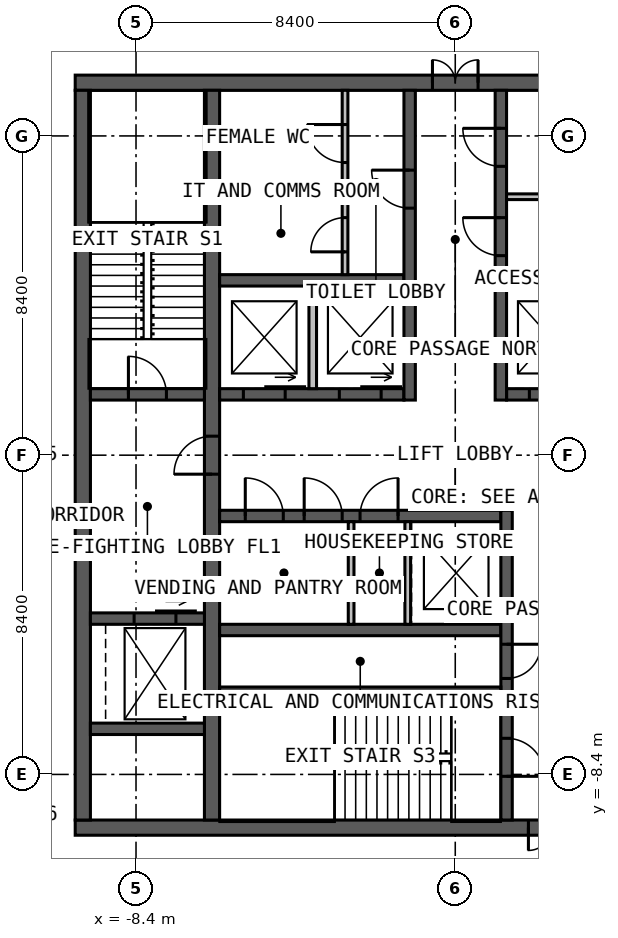
"""IFC4 building model, lengths in metres.
Left out: names, types, materials, properties, quantities, classifications, styles, units other than length and angle.
Written with IfcOpenShell. Run it as: python <this file> out.ifc"""

import sys

from ifc_helpers import new_model, si_unit, direction, frame, frame_2d, origin, place, context, subcontext, project, spatial, rectangle, extrude, element, fill, save


model = new_model("IFC4")
c1 = context("Model", 3, precision=1e-05, world=origin(), true_north=direction((0.0, 1.0)))
c2 = subcontext(c1, "Body", "Model", "MODEL_VIEW")
j1 = project(units=[si_unit("LENGTHUNIT", "METRE"), si_unit("PLANEANGLEUNIT", "RADIAN")], contexts=[c1])
p1 = place(None, origin())
s1 = spatial("IfcSite", under=j1, at=p1, CompositionType="ELEMENT")
p2 = place(p1, origin())
s2 = spatial("IfcBuilding", under=s1, at=p2, CompositionType="ELEMENT")
p3 = place(p2, frame((0.0, 0.0, 248.0)))
s3 = spatial("IfcBuildingStorey", under=s2, at=p3, CompositionType="ELEMENT", Elevation=248.0)
p4 = place(p3, frame((-10.0, 9.8, 0.0), z_axis=(0.0, 0.0, 1.0), x_axis=(1.0, 0.0, 0.0)))
e1 = element("IfcWall", 1, at=p4, inside=s3, PredefinedType="SOLIDWALL", context=c2, shape_type="SweptSolid", body=[
    extrude(rectangle(XDim=20.0, YDim=0.4, at=frame_2d((10.0, 0.0))), origin(), (0.0, 0.0, 1.0), 4.0),
])
p5 = place(p4, frame((9.4, 0.0, 0.0)))
e2 = element("IfcOpeningElement", 2, at=p5, cuts=e1, PredefinedType="OPENING", context=c2, shape_type="SweptSolid", body=[
    extrude(rectangle(XDim=1.2, YDim=2.2, at=frame_2d((0.6, 1.1))), frame((0.0, 0.21, 0.0), z_axis=(0.0, -1.0, 0.0), x_axis=(1.0, 0.0, 0.0)), (0.0, 0.0, 1.0), 0.42),
])
p6 = place(p3, frame((10.0, -9.8, 0.0), z_axis=(0.0, 0.0, 1.0), x_axis=(-1.0, 0.0, 0.0)))
e3 = element("IfcWall", 3, at=p6, inside=s3, PredefinedType="SOLIDWALL", context=c2, shape_type="SweptSolid", body=[
    extrude(rectangle(XDim=20.0, YDim=0.4, at=frame_2d((10.0, 0.0))), origin(), (0.0, 0.0, 1.0), 4.0),
])
p7 = place(p6, frame((6.875, 0.0, 0.0)))
e4 = element("IfcOpeningElement", 4, at=p7, cuts=e3, PredefinedType="OPENING", context=c2, shape_type="SweptSolid", body=[
    extrude(rectangle(XDim=1.2, YDim=2.2, at=frame_2d((0.6, 1.1))), frame((0.0, 0.21, 0.0), z_axis=(0.0, -1.0, 0.0), x_axis=(1.0, 0.0, 0.0)), (0.0, 0.0, 1.0), 0.42),
])
p8 = place(p3, frame((-9.8, 9.6, 0.0), z_axis=(0.0, 0.0, 1.0), x_axis=(0.0, -1.0, 0.0)))
e5 = element("IfcWall", 5, at=p8, inside=s3, PredefinedType="SOLIDWALL", context=c2, shape_type="SweptSolid", body=[
    extrude(rectangle(XDim=19.2, YDim=0.4, at=frame_2d((9.6, 0.0))), origin(), (0.0, 0.0, 1.0), 4.0),
])
p9 = place(p3, frame((-6.4, -9.6, 0.0), z_axis=(0.0, 0.0, 1.0), x_axis=(0.0, 1.0, 0.0)))
e6 = element("IfcWall", 6, at=p9, inside=s3, PredefinedType="SOLIDWALL", context=c2, shape_type="SweptSolid", body=[
    extrude(rectangle(XDim=19.2, YDim=0.4, at=frame_2d((9.6, 0.0))), origin(), (0.0, 0.0, 1.0), 4.0),
])
p10 = place(p9, frame((9.1, 0.0, 0.0)))
e7 = element("IfcOpeningElement", 7, at=p10, cuts=e6, PredefinedType="OPENING", context=c2, shape_type="SweptSolid", body=[
    extrude(rectangle(XDim=1.0, YDim=2.2, at=frame_2d((0.5, 1.1))), frame((0.0, 0.21, 0.0), z_axis=(0.0, -1.0, 0.0), x_axis=(1.0, 0.0, 0.0)), (0.0, 0.0, 1.0), 0.42),
])
p11 = place(p3, frame((-6.2, 1.6, 0.0), z_axis=(0.0, 0.0, 1.0), x_axis=(1.0, 0.0, 0.0)))
e8 = element("IfcWall", 8, at=p11, inside=s3, PredefinedType="SOLIDWALL", context=c2, shape_type="SweptSolid", body=[
    extrude(rectangle(XDim=4.85, YDim=0.3, at=frame_2d((2.425, 0.0))), origin(), (0.0, 0.0, 1.0), 4.0),
])
p12 = place(p11, frame((0.625, 0.0, 0.0)))
e9 = element("IfcOpeningElement", 9, at=p12, cuts=e8, PredefinedType="OPENING", context=c2, shape_type="SweptSolid", body=[
    extrude(rectangle(XDim=1.1, YDim=2.2, at=frame_2d((0.55, 1.1))), frame((0.0, 0.16, 0.0), z_axis=(0.0, -1.0, 0.0), x_axis=(1.0, 0.0, 0.0)), (0.0, 0.0, 1.0), 0.32),
])
p13 = place(p11, frame((3.15, 0.0, 0.0)))
e10 = element("IfcOpeningElement", 10, at=p13, cuts=e8, PredefinedType="OPENING", context=c2, shape_type="SweptSolid", body=[
    extrude(rectangle(XDim=1.1, YDim=2.2, at=frame_2d((0.55, 1.1))), frame((0.0, 0.16, 0.0), z_axis=(0.0, -1.0, 0.0), x_axis=(1.0, 0.0, 0.0)), (0.0, 0.0, 1.0), 0.32),
])
p14 = place(p3, frame((1.35, 1.6, 0.0), z_axis=(0.0, 0.0, 1.0), x_axis=(1.0, 0.0, 0.0)))
e11 = element("IfcWall", 11, at=p14, inside=s3, PredefinedType="SOLIDWALL", context=c2, shape_type="SweptSolid", body=[
    extrude(rectangle(XDim=4.85, YDim=0.3, at=frame_2d((2.425, 0.0))), origin(), (0.0, 0.0, 1.0), 4.0),
])
p15 = place(p14, frame((0.6, 0.0, 0.0)))
e12 = element("IfcOpeningElement", 12, at=p15, cuts=e11, PredefinedType="OPENING", context=c2, shape_type="SweptSolid", body=[
    extrude(rectangle(XDim=1.1, YDim=2.2, at=frame_2d((0.55, 1.1))), frame((0.0, 0.16, 0.0), z_axis=(0.0, -1.0, 0.0), x_axis=(1.0, 0.0, 0.0)), (0.0, 0.0, 1.0), 0.32),
])
p16 = place(p14, frame((3.125, 0.0, 0.0)))
e13 = element("IfcOpeningElement", 13, at=p16, cuts=e11, PredefinedType="OPENING", context=c2, shape_type="SweptSolid", body=[
    extrude(rectangle(XDim=1.1, YDim=2.2, at=frame_2d((0.55, 1.1))), frame((0.0, 0.16, 0.0), z_axis=(0.0, -1.0, 0.0), x_axis=(1.0, 0.0, 0.0)), (0.0, 0.0, 1.0), 0.32),
])
for number, where, z_axis, x_axis in (
    (14, (-6.2, 4.6, 0.0), (0.0, 0.0, 1.0), (1.0, 0.0, 0.0)),
    (15, (1.35, 4.6, 0.0), (0.0, 0.0, 1.0), (1.0, 0.0, 0.0)),
):
    element("IfcWall", number, at=place(p3, frame(where, z_axis=z_axis, x_axis=x_axis)), inside=s3, PredefinedType="SOLIDWALL", context=c2, shape_type="SweptSolid", body=[
        extrude(rectangle(XDim=4.85, YDim=0.3, at=frame_2d((2.425, 0.0))), origin(), (0.0, 0.0, 1.0), 4.0),
    ])
p17 = place(p3, frame((-1.2, 1.45, 0.0), z_axis=(0.0, 0.0, 1.0), x_axis=(0.0, 1.0, 0.0)))
e16 = element("IfcWall", 16, at=p17, inside=s3, PredefinedType="SOLIDWALL", context=c2, shape_type="SweptSolid", body=[
    extrude(rectangle(XDim=8.15, YDim=0.3, at=frame_2d((4.075, 0.0))), origin(), (0.0, 0.0, 1.0), 4.0),
])
p18 = place(p17, frame((5.05, 0.0, 0.0)))
e17 = element("IfcOpeningElement", 17, at=p18, cuts=e16, PredefinedType="OPENING", context=c2, shape_type="SweptSolid", body=[
    extrude(rectangle(XDim=1.0, YDim=2.2, at=frame_2d((0.5, 1.1))), frame((0.0, 0.16, 0.0), z_axis=(0.0, -1.0, 0.0), x_axis=(1.0, 0.0, 0.0)), (0.0, 0.0, 1.0), 0.32),
])
p19 = place(p3, frame((1.2, 1.45, 0.0), z_axis=(0.0, 0.0, 1.0), x_axis=(0.0, 1.0, 0.0)))
e18 = element("IfcWall", 18, at=p19, inside=s3, PredefinedType="SOLIDWALL", context=c2, shape_type="SweptSolid", body=[
    extrude(rectangle(XDim=8.15, YDim=0.3, at=frame_2d((4.075, 0.0))), origin(), (0.0, 0.0, 1.0), 4.0),
])
p20 = place(p19, frame((3.8, 0.0, 0.0)))
e19 = element("IfcOpeningElement", 19, at=p20, cuts=e18, PredefinedType="OPENING", context=c2, shape_type="SweptSolid", body=[
    extrude(rectangle(XDim=1.0, YDim=2.2, at=frame_2d((0.5, 1.1))), frame((0.0, 0.16, 0.0), z_axis=(0.0, -1.0, 0.0), x_axis=(1.0, 0.0, 0.0)), (0.0, 0.0, 1.0), 0.32),
])
p21 = place(p19, frame((6.15, 0.0, 0.0)))
e20 = element("IfcOpeningElement", 20, at=p21, cuts=e18, PredefinedType="OPENING", context=c2, shape_type="SweptSolid", body=[
    extrude(rectangle(XDim=1.0, YDim=2.2, at=frame_2d((0.5, 1.1))), frame((0.0, 0.16, 0.0), z_axis=(0.0, -1.0, 0.0), x_axis=(1.0, 0.0, 0.0)), (0.0, 0.0, 1.0), 0.32),
])
p22 = place(p3, frame((-6.2, -1.6, 0.0), z_axis=(0.0, 0.0, 1.0), x_axis=(1.0, 0.0, 0.0)))
e21 = element("IfcWall", 21, at=p22, inside=s3, PredefinedType="SOLIDWALL", context=c2, shape_type="SweptSolid", body=[
    extrude(rectangle(XDim=7.4, YDim=0.3, at=frame_2d((3.7, 0.0))), origin(), (0.0, 0.0, 1.0), 4.0),
])
p23 = place(p22, frame((0.675, 0.0, 0.0)))
e22 = element("IfcOpeningElement", 22, at=p23, cuts=e21, PredefinedType="OPENING", context=c2, shape_type="SweptSolid", body=[
    extrude(rectangle(XDim=1.0, YDim=2.2, at=frame_2d((0.5, 1.1))), frame((0.0, 0.16, 0.0), z_axis=(0.0, -1.0, 0.0), x_axis=(1.0, 0.0, 0.0)), (0.0, 0.0, 1.0), 0.32),
])
p24 = place(p22, frame((2.225, 0.0, 0.0)))
e23 = element("IfcOpeningElement", 23, at=p24, cuts=e21, PredefinedType="OPENING", context=c2, shape_type="SweptSolid", body=[
    extrude(rectangle(XDim=1.0, YDim=2.2, at=frame_2d((0.5, 1.1))), frame((0.0, 0.16, 0.0), z_axis=(0.0, -1.0, 0.0), x_axis=(1.0, 0.0, 0.0)), (0.0, 0.0, 1.0), 0.32),
])
p25 = place(p22, frame((3.695, 0.0, 0.0)))
e24 = element("IfcOpeningElement", 24, at=p25, cuts=e21, PredefinedType="OPENING", context=c2, shape_type="SweptSolid", body=[
    extrude(rectangle(XDim=1.0, YDim=2.2, at=frame_2d((0.5, 1.1))), frame((0.0, 0.16, 0.0), z_axis=(0.0, -1.0, 0.0), x_axis=(1.0, 0.0, 0.0)), (0.0, 0.0, 1.0), 0.32),
])
p26 = place(p3, frame((-6.2, -4.6, 0.0), z_axis=(0.0, 0.0, 1.0), x_axis=(1.0, 0.0, 0.0)))
e25 = element("IfcWall", 25, at=p26, inside=s3, PredefinedType="SOLIDWALL", context=c2, shape_type="SweptSolid", body=[
    extrude(rectangle(XDim=7.4, YDim=0.3, at=frame_2d((3.7, 0.0))), origin(), (0.0, 0.0, 1.0), 4.0),
])
p27 = place(p3, frame((1.35, -1.45, 0.0), z_axis=(0.0, 0.0, 1.0), x_axis=(0.0, -1.0, 0.0)))
e26 = element("IfcWall", 26, at=p27, inside=s3, PredefinedType="SOLIDWALL", context=c2, shape_type="SweptSolid", body=[
    extrude(rectangle(XDim=8.15, YDim=0.3, at=frame_2d((4.075, 0.0))), origin(), (0.0, 0.0, 1.0), 4.0),
])
p28 = place(p27, frame((6.0, 0.0, 0.0)))
e27 = element("IfcOpeningElement", 27, at=p28, cuts=e26, PredefinedType="OPENING", context=c2, shape_type="SweptSolid", body=[
    extrude(rectangle(XDim=1.0, YDim=2.2, at=frame_2d((0.5, 1.1))), frame((0.0, 0.16, 0.0), z_axis=(0.0, -1.0, 0.0), x_axis=(1.0, 0.0, 0.0)), (0.0, 0.0, 1.0), 0.32),
])
p29 = place(p27, frame((3.525, 0.0, 0.0)))
e28 = element("IfcOpeningElement", 28, at=p29, cuts=e26, PredefinedType="OPENING", context=c2, shape_type="SweptSolid", body=[
    extrude(rectangle(XDim=0.9, YDim=2.2, at=frame_2d((0.45, 1.1))), frame((0.0, 0.16, 0.0), z_axis=(0.0, -1.0, 0.0), x_axis=(1.0, 0.0, 0.0)), (0.0, 0.0, 1.0), 0.32),
])
p30 = place(p3, frame((-6.2, -6.2, 0.0), z_axis=(0.0, 0.0, 1.0), x_axis=(1.0, 0.0, 0.0)))
e29 = element("IfcWall", 29, at=p30, inside=s3, PredefinedType="SOLIDWALL", context=c2, shape_type="SweptSolid", body=[
    extrude(rectangle(XDim=7.4, YDim=0.2, at=frame_2d((3.7, 0.0))), origin(), (0.0, 0.0, 1.0), 4.0),
])
p31 = place(p3, frame((-9.6, 1.6, 0.0), z_axis=(0.0, 0.0, 1.0), x_axis=(1.0, 0.0, 0.0)))
e30 = element("IfcWall", 30, at=p31, inside=s3, PredefinedType="SOLIDWALL", context=c2, shape_type="SweptSolid", body=[
    extrude(rectangle(XDim=3.0, YDim=0.3, at=frame_2d((1.5, 0.0))), origin(), (0.0, 0.0, 1.0), 4.0),
])
p32 = place(p31, frame((1.0, 0.0, 0.0)))
e31 = element("IfcOpeningElement", 31, at=p32, cuts=e30, PredefinedType="OPENING", context=c2, shape_type="SweptSolid", body=[
    extrude(rectangle(XDim=1.0, YDim=2.2, at=frame_2d((0.5, 1.1))), frame((0.0, 0.16, 0.0), z_axis=(0.0, -1.0, 0.0), x_axis=(1.0, 0.0, 0.0)), (0.0, 0.0, 1.0), 0.32),
])
p33 = place(p3, frame((-9.6, -4.3, 0.0), z_axis=(0.0, 0.0, 1.0), x_axis=(1.0, 0.0, 0.0)))
e32 = element("IfcWall", 32, at=p33, inside=s3, PredefinedType="SOLIDWALL", context=c2, shape_type="SweptSolid", body=[
    extrude(rectangle(XDim=3.0, YDim=0.3, at=frame_2d((1.5, 0.0))), origin(), (0.0, 0.0, 1.0), 4.0),
])
p34 = place(p33, frame((1.15, 0.0, 0.0)))
e33 = element("IfcOpeningElement", 33, at=p34, cuts=e32, PredefinedType="OPENING", context=c2, shape_type="SweptSolid", body=[
    extrude(rectangle(XDim=1.1, YDim=2.2, at=frame_2d((0.55, 1.1))), frame((0.0, 0.16, 0.0), z_axis=(0.0, -1.0, 0.0), x_axis=(1.0, 0.0, 0.0)), (0.0, 0.0, 1.0), 0.32),
])
p35 = place(p3, frame((-9.6, -7.2, 0.0), z_axis=(0.0, 0.0, 1.0), x_axis=(1.0, 0.0, 0.0)))
e34 = element("IfcWall", 34, at=p35, inside=s3, PredefinedType="SOLIDWALL", context=c2, shape_type="SweptSolid", body=[
    extrude(rectangle(XDim=3.0, YDim=0.3, at=frame_2d((1.5, 0.0))), origin(), (0.0, 0.0, 1.0), 4.0),
])
p36 = place(p3, frame((-3.75, 1.75, 0.0), z_axis=(0.0, 0.0, 1.0), x_axis=(0.0, 1.0, 0.0)))
e35 = element("IfcWall", 35, at=p36, inside=s3, PredefinedType="SOLIDWALL", context=c2, shape_type="SweptSolid", body=[
    extrude(rectangle(XDim=2.7, YDim=0.2, at=frame_2d((1.35, 0.0))), origin(), (0.0, 0.0, 1.0), 3.75),
])
p37 = place(p3, frame((1.35, 6.8, 0.0), z_axis=(0.0, 0.0, 1.0), x_axis=(1.0, 0.0, 0.0)))
e36 = element("IfcWall", 36, at=p37, inside=s3, PredefinedType="PARTITIONING", context=c2, shape_type="SweptSolid", body=[
    extrude(rectangle(XDim=4.85, YDim=0.15, at=frame_2d((2.425, 0.0))), origin(), (0.0, 0.0, 1.0), 3.75),
])
p38 = place(p37, frame((3.15, 0.0, 0.0)))
e37 = element("IfcOpeningElement", 37, at=p38, cuts=e36, PredefinedType="OPENING", context=c2, shape_type="SweptSolid", body=[
    extrude(rectangle(XDim=0.9, YDim=2.2, at=frame_2d((0.45, 1.1))), frame((0.0, 0.085, 0.0), z_axis=(0.0, -1.0, 0.0), x_axis=(1.0, 0.0, 0.0)), (0.0, 0.0, 1.0), 0.17),
])
p39 = place(p3, frame((-2.9, 4.75, 0.0), z_axis=(0.0, 0.0, 1.0), x_axis=(0.0, 1.0, 0.0)))
e38 = element("IfcWall", 38, at=p39, inside=s3, PredefinedType="PARTITIONING", context=c2, shape_type="SweptSolid", body=[
    extrude(rectangle(XDim=4.85, YDim=0.15, at=frame_2d((2.425, 0.0))), origin(), (0.0, 0.0, 1.0), 3.75),
])
p40 = place(p39, frame((2.95, 0.0, 0.0)))
e39 = element("IfcOpeningElement", 39, at=p40, cuts=e38, PredefinedType="OPENING", context=c2, shape_type="SweptSolid", body=[
    extrude(rectangle(XDim=1.0, YDim=2.2, at=frame_2d((0.5, 1.1))), frame((0.0, 0.085, 0.0), z_axis=(0.0, -1.0, 0.0), x_axis=(1.0, 0.0, 0.0)), (0.0, 0.0, 1.0), 0.17),
])
p41 = place(p39, frame((0.6, 0.0, 0.0)))
e40 = element("IfcOpeningElement", 40, at=p41, cuts=e38, PredefinedType="OPENING", context=c2, shape_type="SweptSolid", body=[
    extrude(rectangle(XDim=0.9, YDim=2.2, at=frame_2d((0.45, 1.1))), frame((0.0, 0.085, 0.0), z_axis=(0.0, -1.0, 0.0), x_axis=(1.0, 0.0, 0.0)), (0.0, 0.0, 1.0), 0.17),
])
p42 = place(p3, frame((-6.2, 7.0, 0.0), z_axis=(0.0, 0.0, 1.0), x_axis=(1.0, 0.0, 0.0)))
e41 = element("IfcWall", 41, at=p42, inside=s3, PredefinedType="PARTITIONING", context=c2, shape_type="SweptSolid", body=[
    extrude(rectangle(XDim=3.225, YDim=0.15, at=frame_2d((1.612, 0.0))), origin(), (0.0, 0.0, 1.0), 3.75),
])
for number, where, z_axis, x_axis in (
    (42, (-2.74, -1.75, 0.0), (0.0, 0.0, 1.0), (0.0, -1.0, 0.0)),
    (43, (-1.25, -1.75, 0.0), (0.0, 0.0, 1.0), (0.0, -1.0, 0.0)),
):
    element("IfcWall", number, at=place(p3, frame(where, z_axis=z_axis, x_axis=x_axis)), inside=s3, PredefinedType="PARTITIONING", context=c2, shape_type="SweptSolid", body=[
        extrude(rectangle(XDim=2.7, YDim=0.15, at=frame_2d((1.35, 0.0))), origin(), (0.0, 0.0, 1.0), 3.75),
    ])
p43 = place(p5, origin())
e44 = element("IfcDoor", 44, at=p43, inside=s3, OperationType="DOUBLE_DOOR_SINGLE_SWING", PredefinedType="DOOR", context=c2, shape_type="SweptSolid", body=[
    extrude(rectangle(XDim=1.2, YDim=2.2, at=frame_2d((0.6, 1.1))), frame((0.0, 0.025, 0.0), z_axis=(0.0, -1.0, 0.0), x_axis=(1.0, 0.0, 0.0)), (0.0, 0.0, 1.0), 0.05),
])
fill(e2, e44)
p44 = place(p7, origin())
e45 = element("IfcDoor", 45, at=p44, inside=s3, OperationType="DOUBLE_DOOR_SINGLE_SWING", PredefinedType="DOOR", context=c2, shape_type="SweptSolid", body=[
    extrude(rectangle(XDim=1.2, YDim=2.2, at=frame_2d((0.6, 1.1))), frame((0.0, 0.025, 0.0), z_axis=(0.0, -1.0, 0.0), x_axis=(1.0, 0.0, 0.0)), (0.0, 0.0, 1.0), 0.05),
])
fill(e4, e45)
p45 = place(p10, origin())
e46 = element("IfcDoor", 46, at=p45, inside=s3, OperationType="SINGLE_SWING_LEFT", PredefinedType="DOOR", context=c2, shape_type="SweptSolid", body=[
    extrude(rectangle(XDim=1.0, YDim=2.2, at=frame_2d((0.5, 1.1))), frame((0.0, 0.025, 0.0), z_axis=(0.0, -1.0, 0.0), x_axis=(1.0, 0.0, 0.0)), (0.0, 0.0, 1.0), 0.05),
])
fill(e7, e46)
p46 = place(p32, origin())
e47 = element("IfcDoor", 47, at=p46, inside=s3, OperationType="SINGLE_SWING_LEFT", PredefinedType="DOOR", context=c2, shape_type="SweptSolid", body=[
    extrude(rectangle(XDim=1.0, YDim=2.2, at=frame_2d((0.5, 1.1))), frame((0.0, 0.025, 0.0), z_axis=(0.0, -1.0, 0.0), x_axis=(1.0, 0.0, 0.0)), (0.0, 0.0, 1.0), 0.05),
])
fill(e31, e47)
p47 = place(p28, origin())
e48 = element("IfcDoor", 48, at=p47, inside=s3, OperationType="SINGLE_SWING_RIGHT", PredefinedType="DOOR", context=c2, shape_type="SweptSolid", body=[
    extrude(rectangle(XDim=1.0, YDim=2.2, at=frame_2d((0.5, 1.1))), frame((0.0, 0.025, 0.0), z_axis=(0.0, -1.0, 0.0), x_axis=(1.0, 0.0, 0.0)), (0.0, 0.0, 1.0), 0.05),
])
fill(e27, e48)
p48 = place(p18, origin())
e49 = element("IfcDoor", 49, at=p48, inside=s3, OperationType="SINGLE_SWING_RIGHT", PredefinedType="DOOR", context=c2, shape_type="SweptSolid", body=[
    extrude(rectangle(XDim=1.0, YDim=2.2, at=frame_2d((0.5, 1.1))), frame((0.0, 0.025, 0.0), z_axis=(0.0, -1.0, 0.0), x_axis=(1.0, 0.0, 0.0)), (0.0, 0.0, 1.0), 0.05),
])
fill(e17, e49)
p49 = place(p20, origin())
e50 = element("IfcDoor", 50, at=p49, inside=s3, OperationType="SINGLE_SWING_RIGHT", PredefinedType="DOOR", context=c2, shape_type="SweptSolid", body=[
    extrude(rectangle(XDim=1.0, YDim=2.2, at=frame_2d((0.5, 1.1))), frame((0.0, 0.025, 0.0), z_axis=(0.0, -1.0, 0.0), x_axis=(1.0, 0.0, 0.0)), (0.0, 0.0, 1.0), 0.05),
])
fill(e19, e50)
p50 = place(p21, origin())
e51 = element("IfcDoor", 51, at=p50, inside=s3, OperationType="SINGLE_SWING_RIGHT", PredefinedType="DOOR", context=c2, shape_type="SweptSolid", body=[
    extrude(rectangle(XDim=1.0, YDim=2.2, at=frame_2d((0.5, 1.1))), frame((0.0, 0.025, 0.0), z_axis=(0.0, -1.0, 0.0), x_axis=(1.0, 0.0, 0.0)), (0.0, 0.0, 1.0), 0.05),
])
fill(e20, e51)
p51 = place(p29, origin())
e52 = element("IfcDoor", 52, at=p51, inside=s3, OperationType="SINGLE_SWING_LEFT", PredefinedType="DOOR", context=c2, shape_type="SweptSolid", body=[
    extrude(rectangle(XDim=0.9, YDim=2.2, at=frame_2d((0.45, 1.1))), frame((0.0, 0.025, 0.0), z_axis=(0.0, -1.0, 0.0), x_axis=(1.0, 0.0, 0.0)), (0.0, 0.0, 1.0), 0.05),
])
fill(e28, e52)
p52 = place(p40, origin())
e53 = element("IfcDoor", 53, at=p52, inside=s3, OperationType="SINGLE_SWING_RIGHT", PredefinedType="DOOR", context=c2, shape_type="SweptSolid", body=[
    extrude(rectangle(XDim=1.0, YDim=2.2, at=frame_2d((0.5, 1.1))), frame((0.0, 0.025, 0.0), z_axis=(0.0, -1.0, 0.0), x_axis=(1.0, 0.0, 0.0)), (0.0, 0.0, 1.0), 0.05),
])
fill(e39, e53)
p53 = place(p41, origin())
e54 = element("IfcDoor", 54, at=p53, inside=s3, OperationType="SINGLE_SWING_LEFT", PredefinedType="DOOR", context=c2, shape_type="SweptSolid", body=[
    extrude(rectangle(XDim=0.9, YDim=2.2, at=frame_2d((0.45, 1.1))), frame((0.0, 0.025, 0.0), z_axis=(0.0, -1.0, 0.0), x_axis=(1.0, 0.0, 0.0)), (0.0, 0.0, 1.0), 0.05),
])
fill(e40, e54)
p54 = place(p23, origin())
e55 = element("IfcDoor", 55, at=p54, inside=s3, OperationType="SINGLE_SWING_LEFT", PredefinedType="DOOR", context=c2, shape_type="SweptSolid", body=[
    extrude(rectangle(XDim=1.0, YDim=2.2, at=frame_2d((0.5, 1.1))), frame((0.0, 0.025, 0.0), z_axis=(0.0, -1.0, 0.0), x_axis=(1.0, 0.0, 0.0)), (0.0, 0.0, 1.0), 0.05),
])
fill(e22, e55)
p55 = place(p24, origin())
e56 = element("IfcDoor", 56, at=p55, inside=s3, OperationType="SINGLE_SWING_LEFT", PredefinedType="DOOR", context=c2, shape_type="SweptSolid", body=[
    extrude(rectangle(XDim=1.0, YDim=2.2, at=frame_2d((0.5, 1.1))), frame((0.0, 0.025, 0.0), z_axis=(0.0, -1.0, 0.0), x_axis=(1.0, 0.0, 0.0)), (0.0, 0.0, 1.0), 0.05),
])
fill(e23, e56)
p56 = place(p25, origin())
e57 = element("IfcDoor", 57, at=p56, inside=s3, OperationType="SINGLE_SWING_RIGHT", PredefinedType="DOOR", context=c2, shape_type="SweptSolid", body=[
    extrude(rectangle(XDim=1.0, YDim=2.2, at=frame_2d((0.5, 1.1))), frame((0.0, 0.025, 0.0), z_axis=(0.0, -1.0, 0.0), x_axis=(1.0, 0.0, 0.0)), (0.0, 0.0, 1.0), 0.05),
])
fill(e24, e57)
p57 = place(p12, origin())
e58 = element("IfcDoor", 58, at=p57, inside=s3, OperationType="SLIDING_TO_LEFT", PredefinedType="DOOR", context=c2, shape_type="SweptSolid", body=[
    extrude(rectangle(XDim=1.1, YDim=2.2, at=frame_2d((0.55, 1.1))), frame((0.0, 0.025, 0.0), z_axis=(0.0, -1.0, 0.0), x_axis=(1.0, 0.0, 0.0)), (0.0, 0.0, 1.0), 0.05),
])
fill(e9, e58)
p58 = place(p13, origin())
e59 = element("IfcDoor", 59, at=p58, inside=s3, OperationType="SLIDING_TO_LEFT", PredefinedType="DOOR", context=c2, shape_type="SweptSolid", body=[
    extrude(rectangle(XDim=1.1, YDim=2.2, at=frame_2d((0.55, 1.1))), frame((0.0, 0.025, 0.0), z_axis=(0.0, -1.0, 0.0), x_axis=(1.0, 0.0, 0.0)), (0.0, 0.0, 1.0), 0.05),
])
fill(e10, e59)
p59 = place(p15, origin())
e60 = element("IfcDoor", 60, at=p59, inside=s3, OperationType="SLIDING_TO_LEFT", PredefinedType="DOOR", context=c2, shape_type="SweptSolid", body=[
    extrude(rectangle(XDim=1.1, YDim=2.2, at=frame_2d((0.55, 1.1))), frame((0.0, 0.025, 0.0), z_axis=(0.0, -1.0, 0.0), x_axis=(1.0, 0.0, 0.0)), (0.0, 0.0, 1.0), 0.05),
])
fill(e12, e60)
p60 = place(p34, origin())
e61 = element("IfcDoor", 61, at=p60, inside=s3, OperationType="SLIDING_TO_LEFT", PredefinedType="DOOR", context=c2, shape_type="SweptSolid", body=[
    extrude(rectangle(XDim=1.1, YDim=2.2, at=frame_2d((0.55, 1.1))), frame((0.0, 0.025, 0.0), z_axis=(0.0, -1.0, 0.0), x_axis=(1.0, 0.0, 0.0)), (0.0, 0.0, 1.0), 0.05),
])
fill(e33, e61)
save(model, sys.argv[1])
